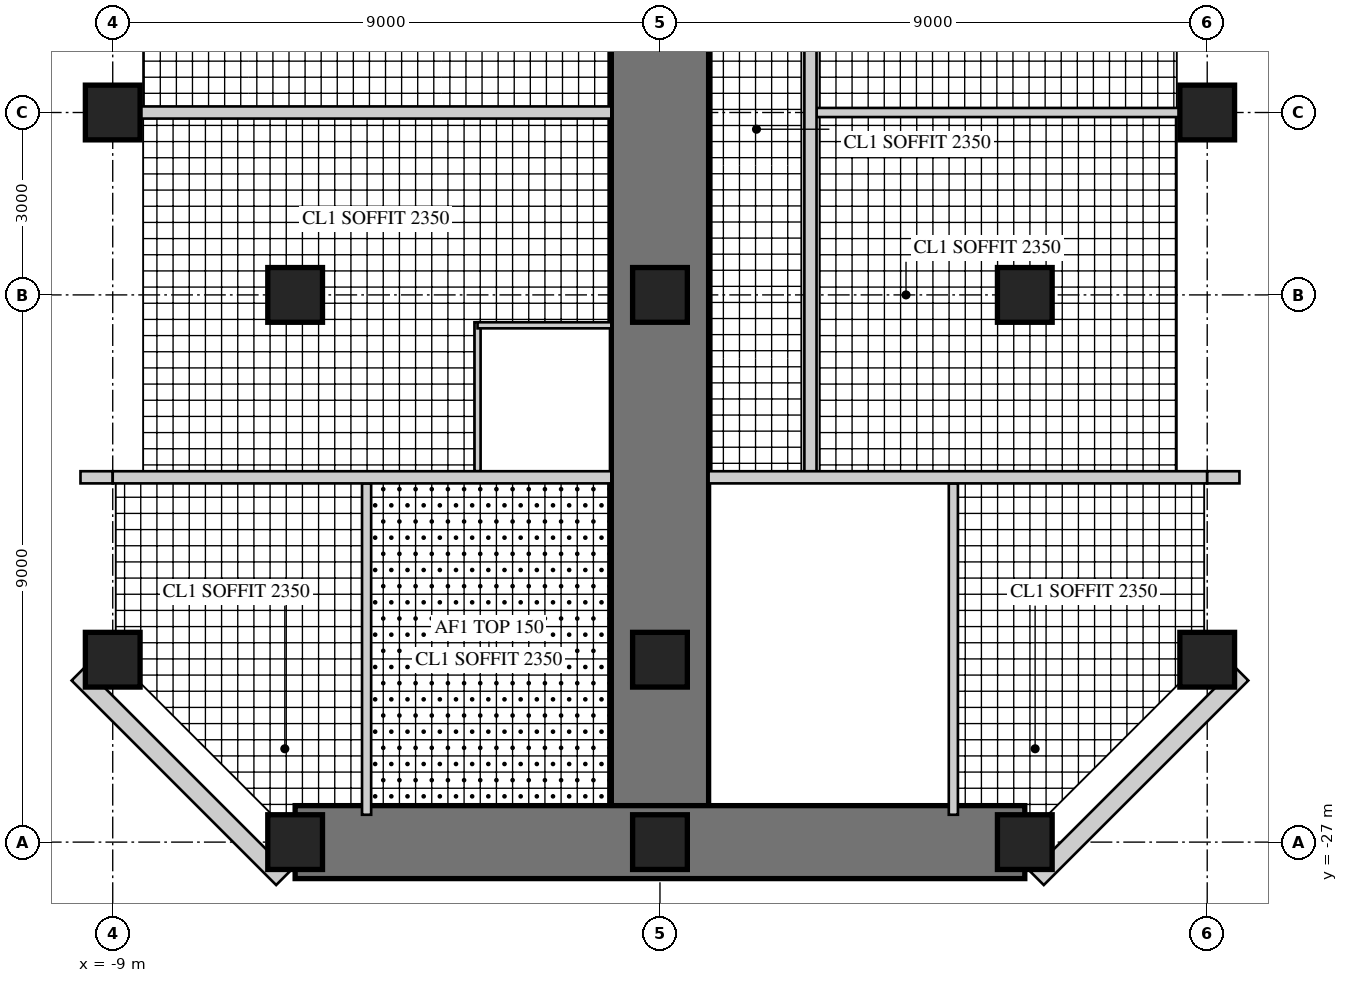
"""IFC4 building model, lengths in metres.
Left out: names, types, materials, properties, quantities, classifications, styles, units other than length and angle.
Written with IfcOpenShell. Run it as: python <this file> out.ifc"""

import sys

from ifc_helpers import new_model, si_unit, direction, frame, frame_2d, origin, origin_2d, place, context, subcontext, project, spatial, rectangle, hollow_rectangle, extrude, element, fill, save


model = new_model("IFC4")
c1 = context("Model", 3, precision=1e-05, world=origin(), true_north=direction((0.0, 1.0)))
c2 = subcontext(c1, "Body", "Model", "MODEL_VIEW")
j1 = project(units=[si_unit("LENGTHUNIT", "METRE"), si_unit("PLANEANGLEUNIT", "RADIAN")], contexts=[c1])
p1 = place(None, origin())
s1 = spatial("IfcSite", under=j1, at=p1, CompositionType="ELEMENT")
p2 = place(p1, origin())
s2 = spatial("IfcBuilding", under=s1, at=p2, CompositionType="ELEMENT")
p3 = place(p2, frame((0.0, 0.0, 200.1)))
s3 = spatial("IfcBuildingStorey", under=s2, at=p3, CompositionType="ELEMENT", Elevation=200.1)
p4 = place(p3, frame((0.0, -9.0, 0.0), z_axis=(0.0, 0.0, 1.0), x_axis=(0.0, -1.0, 0.0)))
e1 = element("IfcWall", 1, at=p4, inside=s3, PredefinedType="SHEAR", context=c2, shape_type="SweptSolid", body=[
    extrude(rectangle(XDim=18.0, YDim=1.6, at=frame_2d((9.0, 0.0))), origin(), (0.0, 0.0, 1.0), 3.4),
])
p5 = place(p4, frame((3.95, 0.0, 0.0)))
e2 = element("IfcOpeningElement", 2, at=p5, cuts=e1, PredefinedType="OPENING", context=c2, shape_type="SweptSolid", body=[
    extrude(rectangle(XDim=1.0, YDim=2.15, at=frame_2d((0.5, 1.075))), frame((0.0, 0.81, 0.0), z_axis=(0.0, -1.0, 0.0), x_axis=(1.0, 0.0, 0.0)), (0.0, 0.0, 1.0), 1.62),
])
p6 = place(p4, frame((6.6, 0.0, 0.0)))
e3 = element("IfcOpeningElement", 3, at=p6, cuts=e1, PredefinedType="OPENING", context=c2, shape_type="SweptSolid", body=[
    extrude(rectangle(XDim=1.0, YDim=2.15, at=frame_2d((0.5, 1.075))), frame((0.0, 0.81, 0.0), z_axis=(0.0, -1.0, 0.0), x_axis=(1.0, 0.0, 0.0)), (0.0, 0.0, 1.0), 1.62),
])
p7 = place(p4, frame((13.25, 0.0, 0.0)))
e4 = element("IfcOpeningElement", 4, at=p7, cuts=e1, PredefinedType="OPENING", context=c2, shape_type="SweptSolid", body=[
    extrude(rectangle(XDim=1.0, YDim=2.2, at=frame_2d((0.5, 1.1))), frame((0.0, 0.81, 0.0), z_axis=(0.0, -1.0, 0.0), x_axis=(1.0, 0.0, 0.0)), (0.0, 0.0, 1.0), 1.62),
])
p8 = place(p3, frame((-6.0, -27.0, 0.0), z_axis=(0.0, 0.0, 1.0), x_axis=(1.0, 0.0, 0.0)))
e5 = element("IfcWall", 5, at=p8, inside=s3, PredefinedType="SHEAR", context=c2, shape_type="SweptSolid", body=[
    extrude(rectangle(XDim=12.0, YDim=1.2, at=frame_2d((6.0, 0.0))), origin(), (0.0, 0.0, 1.0), 3.4),
])
p9 = place(p8, frame((1.425, 0.0, 0.6)))
e6 = element("IfcOpeningElement", 6, at=p9, cuts=e5, PredefinedType="OPENING", context=c2, shape_type="SweptSolid", body=[
    extrude(rectangle(XDim=3.0, YDim=2.4, at=frame_2d((1.5, 1.2))), frame((0.0, 0.61, 0.0), z_axis=(0.0, -1.0, 0.0), x_axis=(1.0, 0.0, 0.0)), (0.0, 0.0, 1.0), 1.22),
])
p10 = place(p8, frame((7.575, 0.0, 0.6)))
e7 = element("IfcOpeningElement", 7, at=p10, cuts=e5, PredefinedType="OPENING", context=c2, shape_type="SweptSolid", body=[
    extrude(rectangle(XDim=3.0, YDim=2.4, at=frame_2d((1.5, 1.2))), frame((0.0, 0.61, 0.0), z_axis=(0.0, -1.0, 0.0), x_axis=(1.0, 0.0, 0.0)), (0.0, 0.0, 1.0), 1.22),
])
for number, where, z_axis, x_axis in (
    (8, (-9.0, -15.0, 0.0), (0.0, 0.0, 1.0), (1.0, 0.0, 0.0)),
    (9, (-9.0, -24.0, 0.0), (0.0, 0.0, 1.0), (1.0, 0.0, 0.0)),
    (10, (9.0, -15.0, 0.0), (0.0, 0.0, 1.0), (1.0, 0.0, 0.0)),
    (11, (9.0, -24.0, 0.0), (0.0, 0.0, 1.0), (1.0, 0.0, 0.0)),
    (12, (-6.0, -27.0, 0.0), (0.0, 0.0, 1.0), (1.0, 0.0, 0.0)),
    (13, (0.0, -27.0, 0.0), (0.0, 0.0, 1.0), (1.0, 0.0, 0.0)),
    (14, (6.0, -27.0, 0.0), (0.0, 0.0, 1.0), (1.0, 0.0, 0.0)),
    (15, (-6.0, -18.0, 0.0), (0.0, 0.0, 1.0), (1.0, 0.0, 0.0)),
    (16, (0.0, -18.0, 0.0), (0.0, 0.0, 1.0), (1.0, 0.0, 0.0)),
    (17, (6.0, -18.0, 0.0), (0.0, 0.0, 1.0), (1.0, 0.0, 0.0)),
    (18, (0.0, -24.0, 0.0), (0.0, 0.0, 1.0), (1.0, 0.0, 0.0)),
):
    element("IfcColumn", number, at=place(p3, frame(where, z_axis=z_axis, x_axis=x_axis)), inside=s3, PredefinedType="COLUMN", context=c2, shape_type="SweptSolid", body=[
        extrude(rectangle(XDim=0.9, YDim=0.9, at=origin_2d()), origin(), (0.0, 0.0, 1.0), 3.4),
    ])
p11 = place(p3, frame((-9.57, -24.236, 0.0), z_axis=(0.0, 0.0, 1.0), x_axis=(0.707106781187, -0.707106781187, 0.0)))
e19 = element("IfcWall", 19, at=p11, inside=s3, PredefinedType="SOLIDWALL", context=c2, shape_type="SweptSolid", body=[
    extrude(rectangle(XDim=4.757, YDim=0.3, at=frame_2d((2.379, 0.0))), origin(), (0.0, 0.0, 1.0), 3.22),
])
p12 = place(p11, frame((1.929, 0.0, 0.3)))
e20 = element("IfcOpeningElement", 20, at=p12, cuts=e19, PredefinedType="OPENING", context=c2, shape_type="SweptSolid", body=[
    extrude(rectangle(XDim=0.9, YDim=2.4, at=frame_2d((0.45, 1.2))), frame((0.0, 0.16, 0.0), z_axis=(0.0, -1.0, 0.0), x_axis=(1.0, 0.0, 0.0)), (0.0, 0.0, 1.0), 0.32),
])
p13 = place(p3, frame((6.206, -27.6, 0.0), z_axis=(0.0, 0.0, 1.0), x_axis=(0.707106781187, 0.707106781187, 0.0)))
e21 = element("IfcWall", 21, at=p13, inside=s3, PredefinedType="SOLIDWALL", context=c2, shape_type="SweptSolid", body=[
    extrude(rectangle(XDim=4.757, YDim=0.3, at=frame_2d((2.379, 0.0))), origin(), (0.0, 0.0, 1.0), 3.22),
])
p14 = place(p13, frame((1.929, 0.0, 0.3)))
e22 = element("IfcOpeningElement", 22, at=p14, cuts=e21, PredefinedType="OPENING", context=c2, shape_type="SweptSolid", body=[
    extrude(rectangle(XDim=0.9, YDim=2.4, at=frame_2d((0.45, 1.2))), frame((0.0, 0.16, 0.0), z_axis=(0.0, -1.0, 0.0), x_axis=(1.0, 0.0, 0.0)), (0.0, 0.0, 1.0), 0.32),
])
p15 = place(p3, frame((2.575, -15.0, 0.0), z_axis=(0.0, 0.0, 1.0), x_axis=(1.0, 0.0, 0.0)))
e23 = element("IfcWall", 23, at=p15, inside=s3, PredefinedType="PARTITIONING", context=c2, shape_type="SweptSolid", body=[
    extrude(rectangle(XDim=5.975, YDim=0.15, at=frame_2d((2.988, 0.0))), origin(), (0.0, 0.0, 1.0), 2.47),
])
p16 = place(p15, frame((0.5, 0.0, 0.0)))
e24 = element("IfcOpeningElement", 24, at=p16, cuts=e23, PredefinedType="OPENING", context=c2, shape_type="SweptSolid", body=[
    extrude(rectangle(XDim=1.0, YDim=2.1, at=frame_2d((0.5, 1.05))), frame((0.0, 0.085, 0.0), z_axis=(0.0, -1.0, 0.0), x_axis=(1.0, 0.0, 0.0)), (0.0, 0.0, 1.0), 0.17),
])
p17 = place(p3, frame((-8.55, -15.0, 0.0), z_axis=(0.0, 0.0, 1.0), x_axis=(1.0, 0.0, 0.0)))
e25 = element("IfcWall", 25, at=p17, inside=s3, PredefinedType="SOLIDWALL", context=c2, shape_type="SweptSolid", body=[
    extrude(rectangle(XDim=7.75, YDim=0.2, at=frame_2d((3.875, 0.0))), origin(), (0.0, 0.0, 1.0), 2.47),
])
p18 = place(p3, frame((-3.0, -18.45, 0.0), z_axis=(0.0, 0.0, 1.0), x_axis=(0.0, -1.0, 0.0)))
e26 = element("IfcWall", 26, at=p18, inside=s3, PredefinedType="PARTITIONING", context=c2, shape_type="SweptSolid", body=[
    extrude(rectangle(XDim=2.45, YDim=0.1, at=frame_2d((1.225, 0.0))), origin(), (0.0, 0.0, 1.0), 3.22),
])
p19 = place(p3, frame((-3.0, -18.5, 0.0), z_axis=(0.0, 0.0, 1.0), x_axis=(1.0, 0.0, 0.0)))
e27 = element("IfcWall", 27, at=p19, inside=s3, PredefinedType="PARTITIONING", context=c2, shape_type="SweptSolid", body=[
    extrude(rectangle(XDim=2.2, YDim=0.1, at=frame_2d((1.1, 0.0))), origin(), (0.0, 0.0, 1.0), 3.22),
])
p20 = place(p19, frame((0.55, 0.0, 0.0)))
e28 = element("IfcOpeningElement", 28, at=p20, cuts=e27, PredefinedType="OPENING", context=c2, shape_type="SweptSolid", body=[
    extrude(rectangle(XDim=0.9, YDim=2.1, at=frame_2d((0.45, 1.05))), frame((0.0, 0.06, 0.0), z_axis=(0.0, -1.0, 0.0), x_axis=(1.0, 0.0, 0.0)), (0.0, 0.0, 1.0), 0.12),
])
p21 = place(p3, frame((2.475, -9.55, 0.0), z_axis=(0.0, 0.0, 1.0), x_axis=(0.0, -1.0, 0.0)))
e29 = element("IfcWall", 29, at=p21, inside=s3, PredefinedType="SOLIDWALL", context=c2, shape_type="SweptSolid", body=[
    extrude(rectangle(XDim=11.45, YDim=0.2, at=frame_2d((5.725, 0.0))), origin(), (0.0, 0.0, 1.0), 3.22),
])
p22 = place(p21, frame((3.4, 0.0, 0.0)))
e30 = element("IfcOpeningElement", 30, at=p22, cuts=e29, PredefinedType="OPENING", context=c2, shape_type="SweptSolid", body=[
    extrude(rectangle(XDim=1.0, YDim=2.15, at=frame_2d((0.5, 1.075))), frame((0.0, 0.11, 0.0), z_axis=(0.0, -1.0, 0.0), x_axis=(1.0, 0.0, 0.0)), (0.0, 0.0, 1.0), 0.22),
])
p23 = place(p3, frame((4.825, -21.1, 0.0), z_axis=(0.0, 0.0, 1.0), x_axis=(0.0, -1.0, 0.0)))
e31 = element("IfcWall", 31, at=p23, inside=s3, PredefinedType="PARTITIONING", context=c2, shape_type="SweptSolid", body=[
    extrude(rectangle(XDim=5.45, YDim=0.15, at=frame_2d((2.725, 0.0))), origin(), (0.0, 0.0, 1.0), 3.22),
])
p24 = place(p23, frame((0.6, 0.0, 0.0)))
e32 = element("IfcOpeningElement", 32, at=p24, cuts=e31, PredefinedType="OPENING", context=c2, shape_type="SweptSolid", body=[
    extrude(rectangle(XDim=1.0, YDim=2.1, at=frame_2d((0.5, 1.05))), frame((0.0, 0.085, 0.0), z_axis=(0.0, -1.0, 0.0), x_axis=(1.0, 0.0, 0.0)), (0.0, 0.0, 1.0), 0.17),
])
p25 = place(p3, frame((-4.825, -21.1, 0.0), z_axis=(0.0, 0.0, 1.0), x_axis=(0.0, -1.0, 0.0)))
e33 = element("IfcWall", 33, at=p25, inside=s3, PredefinedType="PARTITIONING", context=c2, shape_type="SweptSolid", body=[
    extrude(rectangle(XDim=5.45, YDim=0.15, at=frame_2d((2.725, 0.0))), origin(), (0.0, 0.0, 1.0), 3.22),
])
p26 = place(p25, frame((0.6, 0.0, 0.0)))
e34 = element("IfcOpeningElement", 34, at=p26, cuts=e33, PredefinedType="OPENING", context=c2, shape_type="SweptSolid", body=[
    extrude(rectangle(XDim=1.0, YDim=2.1, at=frame_2d((0.5, 1.05))), frame((0.0, 0.085, 0.0), z_axis=(0.0, -1.0, 0.0), x_axis=(1.0, 0.0, 0.0)), (0.0, 0.0, 1.0), 0.17),
])
p27 = place(p3, frame((-9.53, -21.0, 0.0), z_axis=(0.0, 0.0, 1.0), x_axis=(1.0, 0.0, 0.0)))
e35 = element("IfcWall", 35, at=p27, inside=s3, PredefinedType="SOLIDWALL", context=c2, shape_type="SweptSolid", body=[
    extrude(rectangle(XDim=0.53, YDim=0.2, at=frame_2d((0.265, 0.0))), origin(), (0.0, 0.0, 1.0), 3.22),
])
p28 = place(p3, frame((-9.0, -21.0, 0.0), z_axis=(0.0, 0.0, 1.0), x_axis=(1.0, 0.0, 0.0)))
e36 = element("IfcWall", 36, at=p28, inside=s3, PredefinedType="SOLIDWALL", context=c2, shape_type="SweptSolid", body=[
    extrude(rectangle(XDim=8.2, YDim=0.2, at=frame_2d((4.1, 0.0))), origin(), (0.0, 0.0, 1.0), 2.62),
])
p29 = place(p3, frame((0.8, -21.0, 0.0), z_axis=(0.0, 0.0, 1.0), x_axis=(1.0, 0.0, 0.0)))
e37 = element("IfcWall", 37, at=p29, inside=s3, PredefinedType="SOLIDWALL", context=c2, shape_type="SweptSolid", body=[
    extrude(rectangle(XDim=8.2, YDim=0.2, at=frame_2d((4.1, 0.0))), origin(), (0.0, 0.0, 1.0), 2.62),
])
p30 = place(p29, frame((0.35, 0.0, 0.0)))
e38 = element("IfcOpeningElement", 38, at=p30, cuts=e37, PredefinedType="OPENING", context=c2, shape_type="SweptSolid", body=[
    extrude(rectangle(XDim=1.0, YDim=2.2, at=frame_2d((0.5, 1.1))), frame((0.0, 0.11, 0.0), z_axis=(0.0, -1.0, 0.0), x_axis=(1.0, 0.0, 0.0)), (0.0, 0.0, 1.0), 0.22),
])
p31 = place(p3, frame((9.0, -21.0, 0.0), z_axis=(0.0, 0.0, 1.0), x_axis=(1.0, 0.0, 0.0)))
e39 = element("IfcWall", 39, at=p31, inside=s3, PredefinedType="SOLIDWALL", context=c2, shape_type="SweptSolid", body=[
    extrude(rectangle(XDim=0.53, YDim=0.2, at=frame_2d((0.265, 0.0))), origin(), (0.0, 0.0, 1.0), 3.22),
])
p32 = place(p12, origin())
e40 = element("IfcWindow", 40, at=p32, inside=s3, PartitioningType="SINGLE_PANEL", PredefinedType="WINDOW", context=c2, shape_type="SweptSolid", body=[
    extrude(hollow_rectangle(XDim=0.9, YDim=2.4, WallThickness=0.06, at=frame_2d((0.45, 1.2))), frame((0.0, 0.03, 0.0), z_axis=(0.0, -1.0, 0.0), x_axis=(1.0, 0.0, 0.0)), (0.0, 0.0, 1.0), 0.06),
    extrude(rectangle(XDim=0.779, YDim=2.279, at=frame_2d((0.45, 1.2))), frame((0.0, 0.03, 0.0), z_axis=(0.0, -1.0, 0.0), x_axis=(1.0, 0.0, 0.0)), (0.0, 0.0, 1.0), 0.06),
])
fill(e20, e40)
p33 = place(p9, origin())
e41 = element("IfcWindow", 41, at=p33, inside=s3, PartitioningType="SINGLE_PANEL", PredefinedType="WINDOW", context=c2, shape_type="SweptSolid", body=[
    extrude(hollow_rectangle(XDim=3.0, YDim=2.4, WallThickness=0.06, at=frame_2d((1.5, 1.2))), frame((0.0, 0.03, 0.0), z_axis=(0.0, -1.0, 0.0), x_axis=(1.0, 0.0, 0.0)), (0.0, 0.0, 1.0), 0.06),
    extrude(rectangle(XDim=2.879, YDim=2.279, at=frame_2d((1.5, 1.2))), frame((0.0, 0.03, 0.0), z_axis=(0.0, -1.0, 0.0), x_axis=(1.0, 0.0, 0.0)), (0.0, 0.0, 1.0), 0.06),
])
fill(e6, e41)
p34 = place(p10, origin())
e42 = element("IfcWindow", 42, at=p34, inside=s3, PartitioningType="SINGLE_PANEL", PredefinedType="WINDOW", context=c2, shape_type="SweptSolid", body=[
    extrude(hollow_rectangle(XDim=3.0, YDim=2.4, WallThickness=0.06, at=frame_2d((1.5, 1.2))), frame((0.0, 0.03, 0.0), z_axis=(0.0, -1.0, 0.0), x_axis=(1.0, 0.0, 0.0)), (0.0, 0.0, 1.0), 0.06),
    extrude(rectangle(XDim=2.879, YDim=2.279, at=frame_2d((1.5, 1.2))), frame((0.0, 0.03, 0.0), z_axis=(0.0, -1.0, 0.0), x_axis=(1.0, 0.0, 0.0)), (0.0, 0.0, 1.0), 0.06),
])
fill(e7, e42)
p35 = place(p14, origin())
e43 = element("IfcWindow", 43, at=p35, inside=s3, PartitioningType="SINGLE_PANEL", PredefinedType="WINDOW", context=c2, shape_type="SweptSolid", body=[
    extrude(hollow_rectangle(XDim=0.9, YDim=2.4, WallThickness=0.06, at=frame_2d((0.45, 1.2))), frame((0.0, 0.03, 0.0), z_axis=(0.0, -1.0, 0.0), x_axis=(1.0, 0.0, 0.0)), (0.0, 0.0, 1.0), 0.06),
    extrude(rectangle(XDim=0.779, YDim=2.279, at=frame_2d((0.45, 1.2))), frame((0.0, 0.03, 0.0), z_axis=(0.0, -1.0, 0.0), x_axis=(1.0, 0.0, 0.0)), (0.0, 0.0, 1.0), 0.06),
])
fill(e22, e43)
p36 = place(p16, origin())
e44 = element("IfcDoor", 44, at=p36, inside=s3, OperationType="SINGLE_SWING_LEFT", PredefinedType="DOOR", context=c2, shape_type="SweptSolid", body=[
    extrude(rectangle(XDim=1.0, YDim=2.1, at=frame_2d((0.5, 1.05))), frame((0.0, 0.025, 0.0), z_axis=(0.0, -1.0, 0.0), x_axis=(1.0, 0.0, 0.0)), (0.0, 0.0, 1.0), 0.05),
])
fill(e24, e44)
p37 = place(p20, frame((0.9, 0.0, 0.0), z_axis=(0.0, 0.0, 1.0), x_axis=(-1.0, 0.0, 0.0)))
e45 = element("IfcDoor", 45, at=p37, inside=s3, OperationType="SINGLE_SWING_RIGHT", PredefinedType="DOOR", context=c2, shape_type="SweptSolid", body=[
    extrude(rectangle(XDim=0.9, YDim=2.1, at=frame_2d((0.45, 1.05))), frame((0.0, 0.025, 0.0), z_axis=(0.0, -1.0, 0.0), x_axis=(1.0, 0.0, 0.0)), (0.0, 0.0, 1.0), 0.05),
])
fill(e28, e45)
p38 = place(p24, origin())
e46 = element("IfcDoor", 46, at=p38, inside=s3, OperationType="SINGLE_SWING_LEFT", PredefinedType="DOOR", context=c2, shape_type="SweptSolid", body=[
    extrude(rectangle(XDim=1.0, YDim=2.1, at=frame_2d((0.5, 1.05))), frame((0.0, 0.025, 0.0), z_axis=(0.0, -1.0, 0.0), x_axis=(1.0, 0.0, 0.0)), (0.0, 0.0, 1.0), 0.05),
])
fill(e32, e46)
p39 = place(p26, frame((1.0, 0.0, 0.0), z_axis=(0.0, 0.0, 1.0), x_axis=(-1.0, 0.0, 0.0)))
e47 = element("IfcDoor", 47, at=p39, inside=s3, OperationType="SINGLE_SWING_RIGHT", PredefinedType="DOOR", context=c2, shape_type="SweptSolid", body=[
    extrude(rectangle(XDim=1.0, YDim=2.1, at=frame_2d((0.5, 1.05))), frame((0.0, 0.025, 0.0), z_axis=(0.0, -1.0, 0.0), x_axis=(1.0, 0.0, 0.0)), (0.0, 0.0, 1.0), 0.05),
])
fill(e34, e47)
p40 = place(p30, frame((1.0, 0.0, 0.0), z_axis=(0.0, 0.0, 1.0), x_axis=(-1.0, 0.0, 0.0)))
e48 = element("IfcDoor", 48, at=p40, inside=s3, OperationType="SINGLE_SWING_RIGHT", PredefinedType="DOOR", context=c2, shape_type="SweptSolid", body=[
    extrude(rectangle(XDim=1.0, YDim=2.2, at=frame_2d((0.5, 1.1))), frame((0.0, 0.025, 0.0), z_axis=(0.0, -1.0, 0.0), x_axis=(1.0, 0.0, 0.0)), (0.0, 0.0, 1.0), 0.05),
])
fill(e38, e48)
p41 = place(p6, frame((1.0, 0.0, 0.0), z_axis=(0.0, 0.0, 1.0), x_axis=(-1.0, 0.0, 0.0)))
e49 = element("IfcDoor", 49, at=p41, inside=s3, OperationType="SINGLE_SWING_RIGHT", PredefinedType="DOOR", context=c2, shape_type="SweptSolid", body=[
    extrude(rectangle(XDim=1.0, YDim=2.15, at=frame_2d((0.5, 1.075))), frame((0.0, 0.025, 0.0), z_axis=(0.0, -1.0, 0.0), x_axis=(1.0, 0.0, 0.0)), (0.0, 0.0, 1.0), 0.05),
])
fill(e3, e49)
p42 = place(p7, origin())
e50 = element("IfcDoor", 50, at=p42, inside=s3, OperationType="SINGLE_SWING_LEFT", PredefinedType="DOOR", context=c2, shape_type="SweptSolid", body=[
    extrude(rectangle(XDim=1.0, YDim=2.2, at=frame_2d((0.5, 1.1))), frame((0.0, 0.025, 0.0), z_axis=(0.0, -1.0, 0.0), x_axis=(1.0, 0.0, 0.0)), (0.0, 0.0, 1.0), 0.05),
])
fill(e4, e50)
save(model, sys.argv[1])
